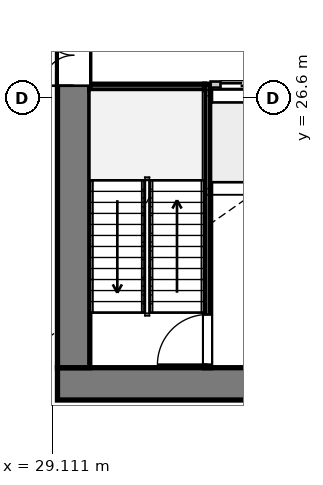
"""IFC4 building model, lengths in metres.
Left out: names, types, materials, properties, quantities, classifications, styles, units other than length and angle.
Written with IfcOpenShell. Run it as: python <this file> out.ifc"""

import sys

from ifc_helpers import new_model, si_unit, direction, frame, frame_2d, origin, place, context, subcontext, project, spatial, rectangle, extrude, source, transform, mapped, element, fill, save


model = new_model("IFC4")
c1 = context("Model", 3, precision=1e-05, world=origin(), true_north=direction((0.0, 1.0)))
c2 = subcontext(c1, "Body", "Model", "MODEL_VIEW")
j1 = project(units=[si_unit("LENGTHUNIT", "METRE"), si_unit("PLANEANGLEUNIT", "RADIAN")], contexts=[c1])
p1 = place(None, origin())
s1 = spatial("IfcSite", under=j1, at=p1, CompositionType="ELEMENT")
p2 = place(p1, origin())
s2 = spatial("IfcBuilding", under=s1, at=p2, CompositionType="ELEMENT")
p3 = place(p2, frame((0.0, 0.0, 20.1)))
s3 = spatial("IfcBuildingStorey", under=s2, at=p3, CompositionType="ELEMENT", Elevation=20.1)
p4 = place(p3, frame((46.75, 19.075, 0.0), z_axis=(0.0, 0.0, 1.0), x_axis=(-1.0, 0.0, 0.0)))
e1 = element("IfcWall", 1, at=p4, inside=s3, PredefinedType="SHEAR", context=c2, shape_type="SweptSolid", body=[
    extrude(rectangle(XDim=17.5, YDim=0.85, at=frame_2d((8.75, 0.0))), origin(), (0.0, 0.0, 1.0), 4.08),
])
p5 = place(p4, frame((4.95, 0.0, 0.0)))
e2 = element("IfcOpeningElement", 2, at=p5, cuts=e1, PredefinedType="OPENING", context=c2, shape_type="SweptSolid", body=[
    extrude(rectangle(XDim=1.12, YDim=2.25, at=frame_2d((0.56, 1.125))), frame((0.0, 0.435, 0.0), z_axis=(0.0, -1.0, 0.0), x_axis=(1.0, 0.0, 0.0)), (0.0, 0.0, 1.0), 0.87),
])
p6 = place(p4, frame((11.45, 0.0, 0.0)))
e3 = element("IfcOpeningElement", 3, at=p6, cuts=e1, PredefinedType="OPENING", context=c2, shape_type="SweptSolid", body=[
    extrude(rectangle(XDim=1.12, YDim=2.25, at=frame_2d((0.56, 1.125))), frame((0.0, 0.435, 0.0), z_axis=(0.0, -1.0, 0.0), x_axis=(1.0, 0.0, 0.0)), (0.0, 0.0, 1.0), 0.87),
])
p7 = place(p3, frame((29.675, 19.5, 0.0), z_axis=(0.0, 0.0, 1.0), x_axis=(0.0, 1.0, 0.0)))
e4 = element("IfcWall", 4, at=p7, inside=s3, PredefinedType="SHEAR", context=c2, shape_type="SweptSolid", body=[
    extrude(rectangle(XDim=14.2, YDim=0.85, at=frame_2d((7.1, 0.0))), origin(), (0.0, 0.0, 1.0), 4.08),
])
p8 = place(p7, frame((7.42, 0.0, 0.0)))
e5 = element("IfcOpeningElement", 5, at=p8, cuts=e4, PredefinedType="OPENING", context=c2, shape_type="SweptSolid", body=[
    extrude(rectangle(XDim=1.6, YDim=2.2, at=frame_2d((0.8, 1.1))), frame((0.0, 0.435, 0.0), z_axis=(0.0, -1.0, 0.0), x_axis=(1.0, 0.0, 0.0)), (0.0, 0.0, 1.0), 0.87),
])
p9 = place(p3, frame((33.2, 19.5, 0.0), z_axis=(0.0, 0.0, 1.0), x_axis=(0.0, 1.0, 0.0)))
e6 = element("IfcWall", 6, at=p9, inside=s3, PredefinedType="PARTITIONING", context=c2, shape_type="SweptSolid", body=[
    extrude(rectangle(XDim=7.46, YDim=0.16, at=frame_2d((3.73, 0.0))), origin(), (0.0, 0.0, 1.0), 4.08),
])
p10 = place(p9, frame((0.08, 0.0, 0.0)))
e7 = element("IfcOpeningElement", 7, at=p10, cuts=e6, PredefinedType="OPENING", context=c2, shape_type="SweptSolid", body=[
    extrude(rectangle(XDim=1.32, YDim=2.2, at=frame_2d((0.66, 1.1))), frame((0.0, 0.09, 0.0), z_axis=(0.0, -1.0, 0.0), x_axis=(1.0, 0.0, 0.0)), (0.0, 0.0, 1.0), 0.18),
])
p11 = place(p3, frame((30.1, 26.88, 0.0), z_axis=(0.0, 0.0, 1.0), x_axis=(1.0, 0.0, 0.0)))
e8 = element("IfcWall", 8, at=p11, inside=s3, PredefinedType="PARTITIONING", context=c2, shape_type="SweptSolid", body=[
    extrude(rectangle(XDim=3.02, YDim=0.16, at=frame_2d((1.51, 0.0))), origin(), (0.0, 0.0, 1.0), 4.08),
])
p12 = place(p3, frame((33.28, 24.49, 0.0), z_axis=(0.0, 0.0, 1.0), x_axis=(1.0, 0.0, 0.0)))
e9 = element("IfcWall", 9, at=p12, inside=s3, PredefinedType="PARTITIONING", context=c2, shape_type="SweptSolid", body=[
    extrude(rectangle(XDim=9.44, YDim=0.16, at=frame_2d((4.72, 0.0))), origin(), (0.0, 0.0, 1.0), 4.08),
])
p13 = place(p3, frame((33.28, 26.95, 0.0), z_axis=(0.0, 0.0, 1.0), x_axis=(1.0, 0.0, 0.0)))
e10 = element("IfcWall", 10, at=p13, inside=s3, PredefinedType="PARTITIONING", context=c2, shape_type="SweptSolid", body=[
    extrude(rectangle(XDim=9.44, YDim=0.16, at=frame_2d((4.72, 0.0))), origin(), (0.0, 0.0, 1.0), 4.08),
])
p14 = place(p13, frame((0.26, 0.0, 0.0)))
e11 = element("IfcOpeningElement", 11, at=p14, cuts=e10, PredefinedType="OPENING", context=c2, shape_type="SweptSolid", body=[
    extrude(rectangle(XDim=1.1, YDim=2.2, at=frame_2d((0.55, 1.1))), frame((0.0, 0.09, 0.0), z_axis=(0.0, -1.0, 0.0), x_axis=(1.0, 0.0, 0.0)), (0.0, 0.0, 1.0), 0.18),
])
p15 = place(p13, frame((2.01, 0.0, 0.0)))
e12 = element("IfcOpeningElement", 12, at=p15, cuts=e10, PredefinedType="OPENING", context=c2, shape_type="SweptSolid", body=[
    extrude(rectangle(XDim=1.1, YDim=2.2, at=frame_2d((0.55, 1.1))), frame((0.0, 0.09, 0.0), z_axis=(0.0, -1.0, 0.0), x_axis=(1.0, 0.0, 0.0)), (0.0, 0.0, 1.0), 0.18),
])
p16 = place(p13, frame((3.76, 0.0, 0.0)))
e13 = element("IfcOpeningElement", 13, at=p16, cuts=e10, PredefinedType="OPENING", context=c2, shape_type="SweptSolid", body=[
    extrude(rectangle(XDim=1.1, YDim=2.2, at=frame_2d((0.55, 1.1))), frame((0.0, 0.09, 0.0), z_axis=(0.0, -1.0, 0.0), x_axis=(1.0, 0.0, 0.0)), (0.0, 0.0, 1.0), 0.18),
])
p17 = place(p13, frame((5.51, 0.0, 0.0)))
e14 = element("IfcOpeningElement", 14, at=p17, cuts=e10, PredefinedType="OPENING", context=c2, shape_type="SweptSolid", body=[
    extrude(rectangle(XDim=1.1, YDim=2.2, at=frame_2d((0.55, 1.1))), frame((0.0, 0.09, 0.0), z_axis=(0.0, -1.0, 0.0), x_axis=(1.0, 0.0, 0.0)), (0.0, 0.0, 1.0), 0.18),
])
m1 = source(origin(), c2, "Body", "SweptSolid", [
    extrude(rectangle(XDim=1.6, YDim=2.2, at=frame_2d((0.8, 1.1))), frame((0.0, 0.025, 0.0), z_axis=(0.0, -1.0, 0.0), x_axis=(1.0, 0.0, 0.0)), (0.0, 0.0, 1.0), 0.05),
])
p18 = place(p8, origin())
e15 = element("IfcDoor", 15, at=p18, inside=s3, OperationType="DOUBLE_DOOR_SINGLE_SWING", PredefinedType="DOOR", context=c2, shape_type="MappedRepresentation", body=[
    mapped(m1, transform((0.0, 0.0, 0.0), x_axis=(1.0, 0.0, 0.0), y_axis=(0.0, 1.0, 0.0), z_axis=(0.0, 0.0, 1.0), scale=1.0)),
])
fill(e5, e15)
m2 = source(origin(), c2, "Body", "SweptSolid", [
    extrude(rectangle(XDim=1.32, YDim=2.2, at=frame_2d((0.66, 1.1))), frame((0.0, 0.025, 0.0), z_axis=(0.0, -1.0, 0.0), x_axis=(1.0, 0.0, 0.0)), (0.0, 0.0, 1.0), 0.05),
])
p19 = place(p10, origin())
e16 = element("IfcDoor", 16, at=p19, inside=s3, OperationType="SINGLE_SWING_LEFT", PredefinedType="DOOR", context=c2, shape_type="MappedRepresentation", body=[
    mapped(m2, transform((0.0, 0.0, 0.0), x_axis=(1.0, 0.0, 0.0), y_axis=(0.0, 1.0, 0.0), z_axis=(0.0, 0.0, 1.0), scale=1.0)),
])
fill(e7, e16)
m3 = source(origin(), c2, "Body", "SweptSolid", [
    extrude(rectangle(XDim=1.1, YDim=2.2, at=frame_2d((0.55, 1.1))), frame((0.0, 0.025, 0.0), z_axis=(0.0, -1.0, 0.0), x_axis=(1.0, 0.0, 0.0)), (0.0, 0.0, 1.0), 0.05),
])
p20 = place(p14, origin())
e17 = element("IfcDoor", 17, at=p20, inside=s3, OperationType="DOUBLE_DOOR_SLIDING", PredefinedType="DOOR", context=c2, shape_type="MappedRepresentation", body=[
    mapped(m3, transform((0.0, 0.0, 0.0), x_axis=(1.0, 0.0, 0.0), y_axis=(0.0, 1.0, 0.0), z_axis=(0.0, 0.0, 1.0), scale=1.0)),
])
fill(e11, e17)
save(model, sys.argv[1])
